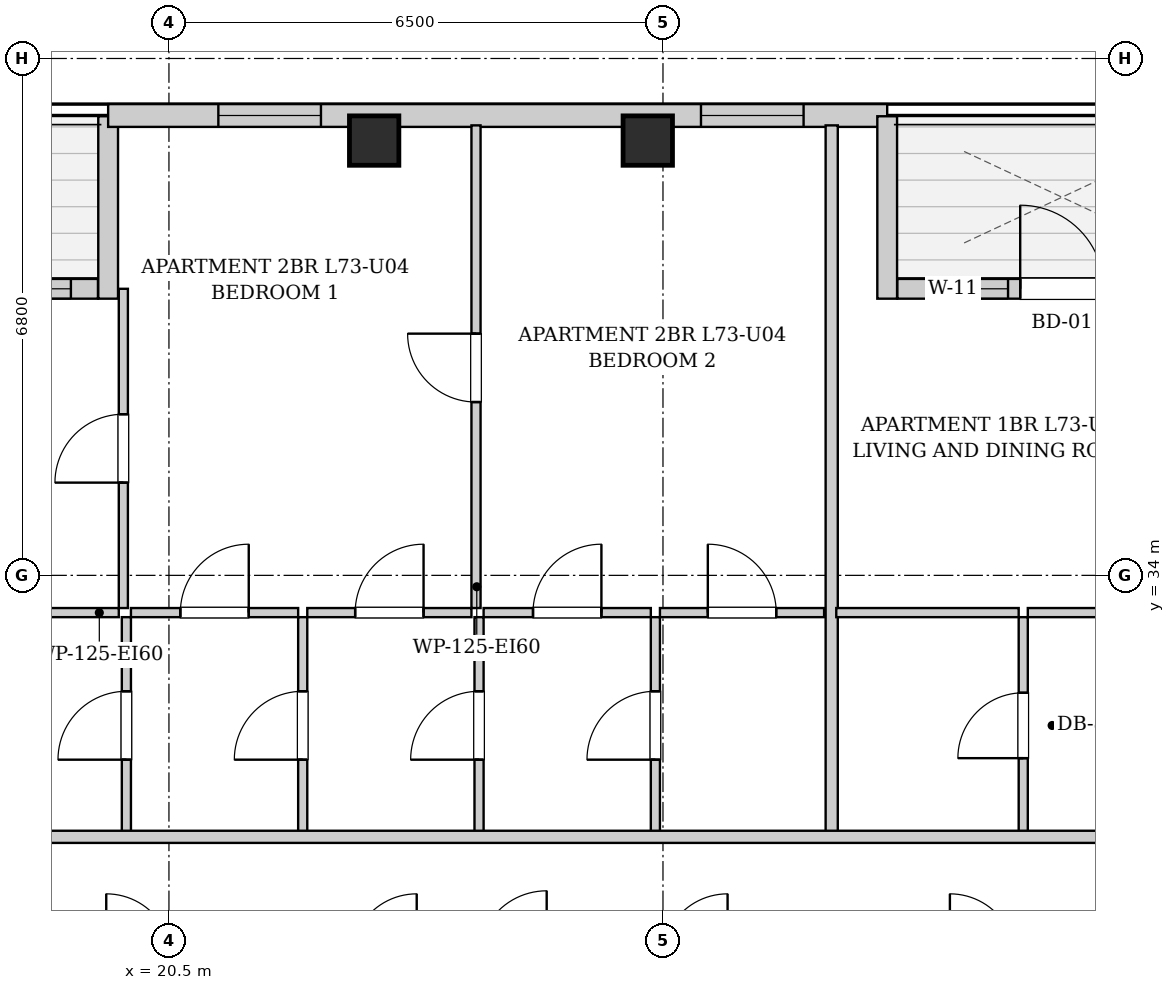
"""IFC4 building model, lengths in metres.
Left out: names, types, materials, properties, quantities, classifications, styles, units other than length and angle.
Written with IfcOpenShell. Run it as: python <this file> out.ifc"""

import sys

from ifc_helpers import new_model, si_unit, direction, frame, frame_2d, origin, origin_2d, place, context, subcontext, project, spatial, rectangle, extrude, element, fill, save


model = new_model("IFC4")
c1 = context("Model", 3, precision=1e-05, world=origin(), true_north=direction((0.0, 1.0)))
c2 = subcontext(c1, "Body", "Model", "MODEL_VIEW")
j1 = project(units=[si_unit("LENGTHUNIT", "METRE"), si_unit("PLANEANGLEUNIT", "RADIAN")], contexts=[c1])
p1 = place(None, origin())
s1 = spatial("IfcSite", under=j1, at=p1, CompositionType="ELEMENT")
p2 = place(p1, origin())
s2 = spatial("IfcBuilding", under=s1, at=p2, CompositionType="ELEMENT")
p3 = place(p2, frame((0.0, 0.0, 251.3)))
s3 = spatial("IfcBuildingStorey", under=s2, at=p3, CompositionType="ELEMENT", Elevation=251.3)
for number, where, z_axis, x_axis in (
    (1, (23.2, 39.72, 0.0), (0.0, 0.0, 1.0), (1.0, 0.0, 0.0)),
    (2, (26.8, 39.72, 0.0), (0.0, 0.0, 1.0), (1.0, 0.0, 0.0)),
):
    element("IfcColumn", number, at=place(p3, frame(where, z_axis=z_axis, x_axis=x_axis)), inside=s3, PredefinedType="COLUMN", context=c2, shape_type="SweptSolid", body=[
        extrude(rectangle(XDim=0.65, YDim=0.65, at=origin_2d()), origin(), (0.0, 0.0, 1.0), 3.4),
    ])
p4 = place(p3, frame((14.534, 37.77, 0.0), z_axis=(0.0, 0.0, 1.0), x_axis=(1.0, 0.0, 0.0)))
e3 = element("IfcWall", 3, at=p4, inside=s3, PredefinedType="SOLIDWALL", context=c2, shape_type="SweptSolid", body=[
    extrude(rectangle(XDim=5.032, YDim=0.26, at=frame_2d((2.516, 0.0))), origin(), (0.0, 0.0, 1.0), 3.14),
])
p5 = place(p4, frame((1.966, 0.0, 0.0)))
e4 = element("IfcOpeningElement", 4, at=p5, cuts=e3, PredefinedType="OPENING", context=c2, shape_type="SweptSolid", body=[
    extrude(rectangle(XDim=1.1, YDim=2.0, at=frame_2d((0.55, 1.0))), frame((0.0, 0.14, 0.0), z_axis=(0.0, -1.0, 0.0), x_axis=(1.0, 0.0, 0.0)), (0.0, 0.0, 1.0), 0.28),
])
p6 = place(p4, frame((3.326, 0.0, 0.55)))
e5 = element("IfcOpeningElement", 5, at=p6, cuts=e3, PredefinedType="OPENING", context=c2, shape_type="SweptSolid", body=[
    extrude(rectangle(XDim=1.35, YDim=1.2, at=frame_2d((0.675, 0.6))), frame((0.0, 0.14, 0.0), z_axis=(0.0, -1.0, 0.0), x_axis=(1.0, 0.0, 0.0)), (0.0, 0.0, 1.0), 0.28),
])
p7 = place(p3, frame((19.7, 37.64, 0.0), z_axis=(0.0, 0.0, 1.0), x_axis=(0.0, 1.0, 0.0)))
e6 = element("IfcWall", 6, at=p7, inside=s3, PredefinedType="SOLIDWALL", context=c2, shape_type="SweptSolid", body=[
    extrude(rectangle(XDim=2.4, YDim=0.26, at=frame_2d((1.2, 0.0))), origin(), (0.0, 0.0, 1.0), 3.14),
])
p8 = place(p3, frame((19.7, 40.05, 0.0), z_axis=(0.0, 0.0, 1.0), x_axis=(1.0, 0.0, 0.0)))
e7 = element("IfcWall", 7, at=p8, inside=s3, PredefinedType="SOLIDWALL", context=c2, shape_type="SweptSolid", body=[
    extrude(rectangle(XDim=10.25, YDim=0.3, at=frame_2d((5.125, 0.0))), origin(), (0.0, 0.0, 1.0), 3.14),
])
p9 = place(p8, frame((1.45, 0.0, 0.55)))
e8 = element("IfcOpeningElement", 8, at=p9, cuts=e7, PredefinedType="OPENING", context=c2, shape_type="SweptSolid", body=[
    extrude(rectangle(XDim=1.35, YDim=1.2, at=frame_2d((0.675, 0.6))), frame((0.0, 0.16, 0.0), z_axis=(0.0, -1.0, 0.0), x_axis=(1.0, 0.0, 0.0)), (0.0, 0.0, 1.0), 0.32),
])
p10 = place(p8, frame((7.8, 0.0, 0.55)))
e9 = element("IfcOpeningElement", 9, at=p10, cuts=e7, PredefinedType="OPENING", context=c2, shape_type="SweptSolid", body=[
    extrude(rectangle(XDim=1.35, YDim=1.2, at=frame_2d((0.675, 0.6))), frame((0.0, 0.16, 0.0), z_axis=(0.0, -1.0, 0.0), x_axis=(1.0, 0.0, 0.0)), (0.0, 0.0, 1.0), 0.32),
])
p11 = place(p3, frame((29.95, 40.04, 0.0), z_axis=(0.0, 0.0, 1.0), x_axis=(0.0, -1.0, 0.0)))
e10 = element("IfcWall", 10, at=p11, inside=s3, PredefinedType="SOLIDWALL", context=c2, shape_type="SweptSolid", body=[
    extrude(rectangle(XDim=2.4, YDim=0.26, at=frame_2d((1.2, 0.0))), origin(), (0.0, 0.0, 1.0), 3.14),
])
p12 = place(p3, frame((30.084, 37.77, 0.0), z_axis=(0.0, 0.0, 1.0), x_axis=(1.0, 0.0, 0.0)))
e11 = element("IfcWall", 11, at=p12, inside=s3, PredefinedType="SOLIDWALL", context=c2, shape_type="SweptSolid", body=[
    extrude(rectangle(XDim=4.332, YDim=0.26, at=frame_2d((2.166, 0.0))), origin(), (0.0, 0.0, 1.0), 3.14),
])
p13 = place(p12, frame((1.616, 0.0, 0.0)))
e12 = element("IfcOpeningElement", 12, at=p13, cuts=e11, PredefinedType="OPENING", context=c2, shape_type="SweptSolid", body=[
    extrude(rectangle(XDim=1.1, YDim=2.0, at=frame_2d((0.55, 1.0))), frame((0.0, 0.14, 0.0), z_axis=(0.0, -1.0, 0.0), x_axis=(1.0, 0.0, 0.0)), (0.0, 0.0, 1.0), 0.28),
])
p14 = place(p12, frame((0.606, 0.0, 0.55)))
e13 = element("IfcOpeningElement", 13, at=p14, cuts=e11, PredefinedType="OPENING", context=c2, shape_type="SweptSolid", body=[
    extrude(rectangle(XDim=0.85, YDim=1.2, at=frame_2d((0.425, 0.6))), frame((0.0, 0.14, 0.0), z_axis=(0.0, -1.0, 0.0), x_axis=(1.0, 0.0, 0.0)), (0.0, 0.0, 1.0), 0.28),
])
p15 = place(p3, frame((19.94, 30.6, 0.0), z_axis=(0.0, 0.0, 1.0), x_axis=(0.0, 1.0, 0.0)))
e14 = element("IfcWall", 14, at=p15, inside=s3, PredefinedType="PARTITIONING", context=c2, shape_type="SweptSolid", body=[
    extrude(rectangle(XDim=2.85, YDim=0.12, at=frame_2d((1.425, 0.0))), origin(), (0.0, 0.0, 1.0), 3.14),
])
p16 = place(p15, frame((0.975, 0.0, 0.0)))
e15 = element("IfcOpeningElement", 15, at=p16, cuts=e14, PredefinedType="OPENING", context=c2, shape_type="SweptSolid", body=[
    extrude(rectangle(XDim=0.9, YDim=2.05, at=frame_2d((0.45, 1.025))), frame((0.0, 0.07, 0.0), z_axis=(0.0, -1.0, 0.0), x_axis=(1.0, 0.0, 0.0)), (0.0, 0.0, 1.0), 0.14),
])
p17 = place(p3, frame((15.978, 33.51, 0.0), z_axis=(0.0, 0.0, 1.0), x_axis=(1.0, 0.0, 0.0)))
e16 = element("IfcWall", 16, at=p17, inside=s3, PredefinedType="PARTITIONING", context=c2, shape_type="SweptSolid", body=[
    extrude(rectangle(XDim=3.862, YDim=0.12, at=frame_2d((1.931, 0.0))), origin(), (0.0, 0.0, 1.0), 3.14),
])
p18 = place(p17, frame((1.481, 0.0, 0.0)))
e17 = element("IfcOpeningElement", 17, at=p18, cuts=e16, PredefinedType="OPENING", context=c2, shape_type="SweptSolid", body=[
    extrude(rectangle(XDim=0.9, YDim=2.05, at=frame_2d((0.45, 1.025))), frame((0.0, 0.07, 0.0), z_axis=(0.0, -1.0, 0.0), x_axis=(1.0, 0.0, 0.0)), (0.0, 0.0, 1.0), 0.14),
])
p19 = place(p3, frame((22.26, 30.6, 0.0), z_axis=(0.0, 0.0, 1.0), x_axis=(0.0, 1.0, 0.0)))
e18 = element("IfcWall", 18, at=p19, inside=s3, PredefinedType="PARTITIONING", context=c2, shape_type="SweptSolid", body=[
    extrude(rectangle(XDim=2.85, YDim=0.12, at=frame_2d((1.425, 0.0))), origin(), (0.0, 0.0, 1.0), 3.14),
])
p20 = place(p19, frame((0.975, 0.0, 0.0)))
e19 = element("IfcOpeningElement", 19, at=p20, cuts=e18, PredefinedType="OPENING", context=c2, shape_type="SweptSolid", body=[
    extrude(rectangle(XDim=0.9, YDim=2.05, at=frame_2d((0.45, 1.025))), frame((0.0, 0.07, 0.0), z_axis=(0.0, -1.0, 0.0), x_axis=(1.0, 0.0, 0.0)), (0.0, 0.0, 1.0), 0.14),
])
p21 = place(p3, frame((20.0, 33.51, 0.0), z_axis=(0.0, 0.0, 1.0), x_axis=(1.0, 0.0, 0.0)))
e20 = element("IfcWall", 20, at=p21, inside=s3, PredefinedType="PARTITIONING", context=c2, shape_type="SweptSolid", body=[
    extrude(rectangle(XDim=2.2, YDim=0.12, at=frame_2d((1.1, 0.0))), origin(), (0.0, 0.0, 1.0), 3.14),
])
p22 = place(p21, frame((0.65, 0.0, 0.0)))
e21 = element("IfcOpeningElement", 21, at=p22, cuts=e20, PredefinedType="OPENING", context=c2, shape_type="SweptSolid", body=[
    extrude(rectangle(XDim=0.9, YDim=2.05, at=frame_2d((0.45, 1.025))), frame((0.0, 0.07, 0.0), z_axis=(0.0, -1.0, 0.0), x_axis=(1.0, 0.0, 0.0)), (0.0, 0.0, 1.0), 0.14),
])
p23 = place(p3, frame((24.58, 30.6, 0.0), z_axis=(0.0, 0.0, 1.0), x_axis=(0.0, 1.0, 0.0)))
e22 = element("IfcWall", 22, at=p23, inside=s3, PredefinedType="PARTITIONING", context=c2, shape_type="SweptSolid", body=[
    extrude(rectangle(XDim=2.85, YDim=0.12, at=frame_2d((1.425, 0.0))), origin(), (0.0, 0.0, 1.0), 3.14),
])
p24 = place(p23, frame((0.975, 0.0, 0.0)))
e23 = element("IfcOpeningElement", 23, at=p24, cuts=e22, PredefinedType="OPENING", context=c2, shape_type="SweptSolid", body=[
    extrude(rectangle(XDim=0.9, YDim=2.05, at=frame_2d((0.45, 1.025))), frame((0.0, 0.07, 0.0), z_axis=(0.0, -1.0, 0.0), x_axis=(1.0, 0.0, 0.0)), (0.0, 0.0, 1.0), 0.14),
])
p25 = place(p3, frame((22.32, 33.51, 0.0), z_axis=(0.0, 0.0, 1.0), x_axis=(1.0, 0.0, 0.0)))
e24 = element("IfcWall", 24, at=p25, inside=s3, PredefinedType="PARTITIONING", context=c2, shape_type="SweptSolid", body=[
    extrude(rectangle(XDim=2.16, YDim=0.12, at=frame_2d((1.08, 0.0))), origin(), (0.0, 0.0, 1.0), 3.14),
])
p26 = place(p25, frame((0.63, 0.0, 0.0)))
e25 = element("IfcOpeningElement", 25, at=p26, cuts=e24, PredefinedType="OPENING", context=c2, shape_type="SweptSolid", body=[
    extrude(rectangle(XDim=0.9, YDim=2.05, at=frame_2d((0.45, 1.025))), frame((0.0, 0.07, 0.0), z_axis=(0.0, -1.0, 0.0), x_axis=(1.0, 0.0, 0.0)), (0.0, 0.0, 1.0), 0.14),
])
p27 = place(p3, frame((26.9, 30.6, 0.0), z_axis=(0.0, 0.0, 1.0), x_axis=(0.0, 1.0, 0.0)))
e26 = element("IfcWall", 26, at=p27, inside=s3, PredefinedType="PARTITIONING", context=c2, shape_type="SweptSolid", body=[
    extrude(rectangle(XDim=2.85, YDim=0.12, at=frame_2d((1.425, 0.0))), origin(), (0.0, 0.0, 1.0), 3.14),
])
p28 = place(p27, frame((0.975, 0.0, 0.0)))
e27 = element("IfcOpeningElement", 27, at=p28, cuts=e26, PredefinedType="OPENING", context=c2, shape_type="SweptSolid", body=[
    extrude(rectangle(XDim=0.9, YDim=2.05, at=frame_2d((0.45, 1.025))), frame((0.0, 0.07, 0.0), z_axis=(0.0, -1.0, 0.0), x_axis=(1.0, 0.0, 0.0)), (0.0, 0.0, 1.0), 0.14),
])
p29 = place(p3, frame((24.64, 33.51, 0.0), z_axis=(0.0, 0.0, 1.0), x_axis=(1.0, 0.0, 0.0)))
e28 = element("IfcWall", 28, at=p29, inside=s3, PredefinedType="PARTITIONING", context=c2, shape_type="SweptSolid", body=[
    extrude(rectangle(XDim=2.2, YDim=0.12, at=frame_2d((1.1, 0.0))), origin(), (0.0, 0.0, 1.0), 3.14),
])
p30 = place(p29, frame((0.65, 0.0, 0.0)))
e29 = element("IfcOpeningElement", 29, at=p30, cuts=e28, PredefinedType="OPENING", context=c2, shape_type="SweptSolid", body=[
    extrude(rectangle(XDim=0.9, YDim=2.05, at=frame_2d((0.45, 1.025))), frame((0.0, 0.07, 0.0), z_axis=(0.0, -1.0, 0.0), x_axis=(1.0, 0.0, 0.0)), (0.0, 0.0, 1.0), 0.14),
])
p31 = place(p3, frame((26.96, 33.51, 0.0), z_axis=(0.0, 0.0, 1.0), x_axis=(1.0, 0.0, 0.0)))
e30 = element("IfcWall", 30, at=p31, inside=s3, PredefinedType="PARTITIONING", context=c2, shape_type="SweptSolid", body=[
    extrude(rectangle(XDim=2.16, YDim=0.12, at=frame_2d((1.08, 0.0))), origin(), (0.0, 0.0, 1.0), 3.14),
])
p32 = place(p31, frame((0.63, 0.0, 0.0)))
e31 = element("IfcOpeningElement", 31, at=p32, cuts=e30, PredefinedType="OPENING", context=c2, shape_type="SweptSolid", body=[
    extrude(rectangle(XDim=0.9, YDim=2.05, at=frame_2d((0.45, 1.025))), frame((0.0, 0.07, 0.0), z_axis=(0.0, -1.0, 0.0), x_axis=(1.0, 0.0, 0.0)), (0.0, 0.0, 1.0), 0.14),
])
p33 = place(p3, frame((19.9, 33.57, 0.0), z_axis=(0.0, 0.0, 1.0), x_axis=(0.0, 1.0, 0.0)))
e32 = element("IfcWall", 32, at=p33, inside=s3, PredefinedType="PARTITIONING", context=c2, shape_type="SweptSolid", body=[
    extrude(rectangle(XDim=4.2, YDim=0.12, at=frame_2d((2.1, 0.0))), origin(), (0.0, 0.0, 1.0), 3.14),
])
p34 = place(p33, frame((1.65, 0.0, 0.0)))
e33 = element("IfcOpeningElement", 33, at=p34, cuts=e32, PredefinedType="OPENING", context=c2, shape_type="SweptSolid", body=[
    extrude(rectangle(XDim=0.9, YDim=2.05, at=frame_2d((0.45, 1.025))), frame((0.0, 0.07, 0.0), z_axis=(0.0, -1.0, 0.0), x_axis=(1.0, 0.0, 0.0)), (0.0, 0.0, 1.0), 0.14),
])
p35 = place(p3, frame((24.54, 33.57, 0.0), z_axis=(0.0, 0.0, 1.0), x_axis=(0.0, 1.0, 0.0)))
e34 = element("IfcWall", 34, at=p35, inside=s3, PredefinedType="PARTITIONING", context=c2, shape_type="SweptSolid", body=[
    extrude(rectangle(XDim=6.35, YDim=0.12, at=frame_2d((3.175, 0.0))), origin(), (0.0, 0.0, 1.0), 3.14),
])
p36 = place(p35, frame((2.71, 0.0, 0.0)))
e35 = element("IfcOpeningElement", 35, at=p36, cuts=e34, PredefinedType="OPENING", context=c2, shape_type="SweptSolid", body=[
    extrude(rectangle(XDim=0.9, YDim=2.05, at=frame_2d((0.45, 1.025))), frame((0.0, 0.07, 0.0), z_axis=(0.0, -1.0, 0.0), x_axis=(1.0, 0.0, 0.0)), (0.0, 0.0, 1.0), 0.14),
])
p37 = place(p3, frame((29.22, 30.6, 0.0), z_axis=(0.0, 0.0, 1.0), x_axis=(0.0, 1.0, 0.0)))
e36 = element("IfcWall", 36, at=p37, inside=s3, PredefinedType="PARTITIONING", context=c2, shape_type="SweptSolid", body=[
    extrude(rectangle(XDim=9.32, YDim=0.16, at=frame_2d((4.66, 0.0))), origin(), (0.0, 0.0, 1.0), 3.14),
])
p38 = place(p3, frame((31.74, 30.6, 0.0), z_axis=(0.0, 0.0, 1.0), x_axis=(0.0, 1.0, 0.0)))
e37 = element("IfcWall", 37, at=p38, inside=s3, PredefinedType="PARTITIONING", context=c2, shape_type="SweptSolid", body=[
    extrude(rectangle(XDim=2.85, YDim=0.12, at=frame_2d((1.425, 0.0))), origin(), (0.0, 0.0, 1.0), 3.14),
])
p39 = place(p38, frame((0.995, 0.0, 0.0)))
e38 = element("IfcOpeningElement", 38, at=p39, cuts=e37, PredefinedType="OPENING", context=c2, shape_type="SweptSolid", body=[
    extrude(rectangle(XDim=0.86, YDim=2.05, at=frame_2d((0.43, 1.025))), frame((0.0, 0.07, 0.0), z_axis=(0.0, -1.0, 0.0), x_axis=(1.0, 0.0, 0.0)), (0.0, 0.0, 1.0), 0.14),
])
p40 = place(p3, frame((29.28, 33.51, 0.0), z_axis=(0.0, 0.0, 1.0), x_axis=(1.0, 0.0, 0.0)))
e39 = element("IfcWall", 39, at=p40, inside=s3, PredefinedType="PARTITIONING", context=c2, shape_type="SweptSolid", body=[
    extrude(rectangle(XDim=2.4, YDim=0.12, at=frame_2d((1.2, 0.0))), origin(), (0.0, 0.0, 1.0), 3.14),
])
p41 = place(p3, frame((31.8, 33.51, 0.0), z_axis=(0.0, 0.0, 1.0), x_axis=(1.0, 0.0, 0.0)))
e40 = element("IfcWall", 40, at=p41, inside=s3, PredefinedType="PARTITIONING", context=c2, shape_type="SweptSolid", body=[
    extrude(rectangle(XDim=2.89, YDim=0.12, at=frame_2d((1.445, 0.0))), origin(), (0.0, 0.0, 1.0), 3.14),
])
p42 = place(p41, frame((0.995, 0.0, 0.0)))
e41 = element("IfcOpeningElement", 41, at=p42, cuts=e40, PredefinedType="OPENING", context=c2, shape_type="SweptSolid", body=[
    extrude(rectangle(XDim=0.9, YDim=2.05, at=frame_2d((0.45, 1.025))), frame((0.0, 0.07, 0.0), z_axis=(0.0, -1.0, 0.0), x_axis=(1.0, 0.0, 0.0)), (0.0, 0.0, 1.0), 0.14),
])
p43 = place(p3, frame((13.15, 30.56, 0.0), z_axis=(0.0, 0.0, 1.0), x_axis=(1.0, 0.0, 0.0)))
e42 = element("IfcWall", 42, at=p43, inside=s3, PredefinedType="PARTITIONING", context=c2, shape_type="SweptSolid", body=[
    extrude(rectangle(XDim=24.6, YDim=0.16, at=frame_2d((12.3, 0.0))), origin(), (0.0, 0.0, 1.0), 3.14),
])
p44 = place(p43, frame((3.165, 0.0, 0.0)))
e43 = element("IfcOpeningElement", 43, at=p44, cuts=e42, PredefinedType="OPENING", context=c2, shape_type="SweptSolid", body=[
    extrude(rectangle(XDim=0.95, YDim=2.1, at=frame_2d((0.475, 1.05))), frame((0.0, 0.09, 0.0), z_axis=(0.0, -1.0, 0.0), x_axis=(1.0, 0.0, 0.0)), (0.0, 0.0, 1.0), 0.18),
])
p45 = place(p43, frame((20.585, 0.0, 0.0)))
e44 = element("IfcOpeningElement", 44, at=p45, cuts=e42, PredefinedType="OPENING", context=c2, shape_type="SweptSolid", body=[
    extrude(rectangle(XDim=0.95, YDim=2.1, at=frame_2d((0.475, 1.05))), frame((0.0, 0.09, 0.0), z_axis=(0.0, -1.0, 0.0), x_axis=(1.0, 0.0, 0.0)), (0.0, 0.0, 1.0), 0.18),
])
p46 = place(p16, origin())
e45 = element("IfcDoor", 45, at=p46, inside=s3, OperationType="SINGLE_SWING_LEFT", PredefinedType="DOOR", context=c2, shape_type="SweptSolid", body=[
    extrude(rectangle(XDim=0.9, YDim=2.05, at=frame_2d((0.45, 1.025))), frame((0.0, 0.025, 0.0), z_axis=(0.0, -1.0, 0.0), x_axis=(1.0, 0.0, 0.0)), (0.0, 0.0, 1.0), 0.05),
])
fill(e15, e45)
p47 = place(p20, origin())
e46 = element("IfcDoor", 46, at=p47, inside=s3, OperationType="SINGLE_SWING_LEFT", PredefinedType="DOOR", context=c2, shape_type="SweptSolid", body=[
    extrude(rectangle(XDim=0.9, YDim=2.05, at=frame_2d((0.45, 1.025))), frame((0.0, 0.025, 0.0), z_axis=(0.0, -1.0, 0.0), x_axis=(1.0, 0.0, 0.0)), (0.0, 0.0, 1.0), 0.05),
])
fill(e19, e46)
p48 = place(p22, origin())
e47 = element("IfcDoor", 47, at=p48, inside=s3, OperationType="SINGLE_SWING_RIGHT", PredefinedType="DOOR", context=c2, shape_type="SweptSolid", body=[
    extrude(rectangle(XDim=0.9, YDim=2.05, at=frame_2d((0.45, 1.025))), frame((0.0, 0.025, 0.0), z_axis=(0.0, -1.0, 0.0), x_axis=(1.0, 0.0, 0.0)), (0.0, 0.0, 1.0), 0.05),
])
fill(e21, e47)
p49 = place(p24, origin())
e48 = element("IfcDoor", 48, at=p49, inside=s3, OperationType="SINGLE_SWING_LEFT", PredefinedType="DOOR", context=c2, shape_type="SweptSolid", body=[
    extrude(rectangle(XDim=0.9, YDim=2.05, at=frame_2d((0.45, 1.025))), frame((0.0, 0.025, 0.0), z_axis=(0.0, -1.0, 0.0), x_axis=(1.0, 0.0, 0.0)), (0.0, 0.0, 1.0), 0.05),
])
fill(e23, e48)
p50 = place(p26, origin())
e49 = element("IfcDoor", 49, at=p50, inside=s3, OperationType="SINGLE_SWING_RIGHT", PredefinedType="DOOR", context=c2, shape_type="SweptSolid", body=[
    extrude(rectangle(XDim=0.9, YDim=2.05, at=frame_2d((0.45, 1.025))), frame((0.0, 0.025, 0.0), z_axis=(0.0, -1.0, 0.0), x_axis=(1.0, 0.0, 0.0)), (0.0, 0.0, 1.0), 0.05),
])
fill(e25, e49)
p51 = place(p28, origin())
e50 = element("IfcDoor", 50, at=p51, inside=s3, OperationType="SINGLE_SWING_LEFT", PredefinedType="DOOR", context=c2, shape_type="SweptSolid", body=[
    extrude(rectangle(XDim=0.9, YDim=2.05, at=frame_2d((0.45, 1.025))), frame((0.0, 0.025, 0.0), z_axis=(0.0, -1.0, 0.0), x_axis=(1.0, 0.0, 0.0)), (0.0, 0.0, 1.0), 0.05),
])
fill(e27, e50)
p52 = place(p30, origin())
e51 = element("IfcDoor", 51, at=p52, inside=s3, OperationType="SINGLE_SWING_RIGHT", PredefinedType="DOOR", context=c2, shape_type="SweptSolid", body=[
    extrude(rectangle(XDim=0.9, YDim=2.05, at=frame_2d((0.45, 1.025))), frame((0.0, 0.025, 0.0), z_axis=(0.0, -1.0, 0.0), x_axis=(1.0, 0.0, 0.0)), (0.0, 0.0, 1.0), 0.05),
])
fill(e29, e51)
p53 = place(p32, origin())
e52 = element("IfcDoor", 52, at=p53, inside=s3, OperationType="SINGLE_SWING_LEFT", PredefinedType="DOOR", context=c2, shape_type="SweptSolid", body=[
    extrude(rectangle(XDim=0.9, YDim=2.05, at=frame_2d((0.45, 1.025))), frame((0.0, 0.025, 0.0), z_axis=(0.0, -1.0, 0.0), x_axis=(1.0, 0.0, 0.0)), (0.0, 0.0, 1.0), 0.05),
])
fill(e31, e52)
p54 = place(p34, origin())
e53 = element("IfcDoor", 53, at=p54, inside=s3, OperationType="SINGLE_SWING_LEFT", PredefinedType="DOOR", context=c2, shape_type="SweptSolid", body=[
    extrude(rectangle(XDim=0.9, YDim=2.05, at=frame_2d((0.45, 1.025))), frame((0.0, 0.025, 0.0), z_axis=(0.0, -1.0, 0.0), x_axis=(1.0, 0.0, 0.0)), (0.0, 0.0, 1.0), 0.05),
])
fill(e33, e53)
p55 = place(p36, origin())
e54 = element("IfcDoor", 54, at=p55, inside=s3, OperationType="SINGLE_SWING_RIGHT", PredefinedType="DOOR", context=c2, shape_type="SweptSolid", body=[
    extrude(rectangle(XDim=0.9, YDim=2.05, at=frame_2d((0.45, 1.025))), frame((0.0, 0.025, 0.0), z_axis=(0.0, -1.0, 0.0), x_axis=(1.0, 0.0, 0.0)), (0.0, 0.0, 1.0), 0.05),
])
fill(e35, e54)
p56 = place(p39, origin())
e55 = element("IfcDoor", 55, at=p56, inside=s3, OperationType="SINGLE_SWING_LEFT", PredefinedType="DOOR", context=c2, shape_type="SweptSolid", body=[
    extrude(rectangle(XDim=0.86, YDim=2.05, at=frame_2d((0.43, 1.025))), frame((0.0, 0.025, 0.0), z_axis=(0.0, -1.0, 0.0), x_axis=(1.0, 0.0, 0.0)), (0.0, 0.0, 1.0), 0.05),
])
fill(e38, e55)
p57 = place(p13, origin())
e56 = element("IfcDoor", 56, at=p57, inside=s3, OperationType="SINGLE_SWING_LEFT", PredefinedType="DOOR", context=c2, shape_type="SweptSolid", body=[
    extrude(rectangle(XDim=1.1, YDim=2.0, at=frame_2d((0.55, 1.0))), frame((0.0, 0.025, 0.0), z_axis=(0.0, -1.0, 0.0), x_axis=(1.0, 0.0, 0.0)), (0.0, 0.0, 1.0), 0.05),
])
fill(e12, e56)
p58 = place(p6, origin())
e57 = element("IfcWindow", 57, at=p58, inside=s3, PartitioningType="SINGLE_PANEL", PredefinedType="WINDOW", context=c2, shape_type="SweptSolid", body=[
    extrude(rectangle(XDim=1.35, YDim=1.2, at=frame_2d((0.675, 0.6))), frame((0.0, 0.03, 0.0), z_axis=(0.0, -1.0, 0.0), x_axis=(1.0, 0.0, 0.0)), (0.0, 0.0, 1.0), 0.06),
])
fill(e5, e57)
p59 = place(p9, origin())
e58 = element("IfcWindow", 58, at=p59, inside=s3, PartitioningType="SINGLE_PANEL", PredefinedType="WINDOW", context=c2, shape_type="SweptSolid", body=[
    extrude(rectangle(XDim=1.35, YDim=1.2, at=frame_2d((0.675, 0.6))), frame((0.0, 0.03, 0.0), z_axis=(0.0, -1.0, 0.0), x_axis=(1.0, 0.0, 0.0)), (0.0, 0.0, 1.0), 0.06),
])
fill(e8, e58)
p60 = place(p10, origin())
e59 = element("IfcWindow", 59, at=p60, inside=s3, PartitioningType="SINGLE_PANEL", PredefinedType="WINDOW", context=c2, shape_type="SweptSolid", body=[
    extrude(rectangle(XDim=1.35, YDim=1.2, at=frame_2d((0.675, 0.6))), frame((0.0, 0.03, 0.0), z_axis=(0.0, -1.0, 0.0), x_axis=(1.0, 0.0, 0.0)), (0.0, 0.0, 1.0), 0.06),
])
fill(e9, e59)
p61 = place(p14, origin())
e60 = element("IfcWindow", 60, at=p61, inside=s3, PartitioningType="SINGLE_PANEL", PredefinedType="WINDOW", context=c2, shape_type="SweptSolid", body=[
    extrude(rectangle(XDim=0.85, YDim=1.2, at=frame_2d((0.425, 0.6))), frame((0.0, 0.03, 0.0), z_axis=(0.0, -1.0, 0.0), x_axis=(1.0, 0.0, 0.0)), (0.0, 0.0, 1.0), 0.06),
])
fill(e13, e60)
save(model, sys.argv[1])
